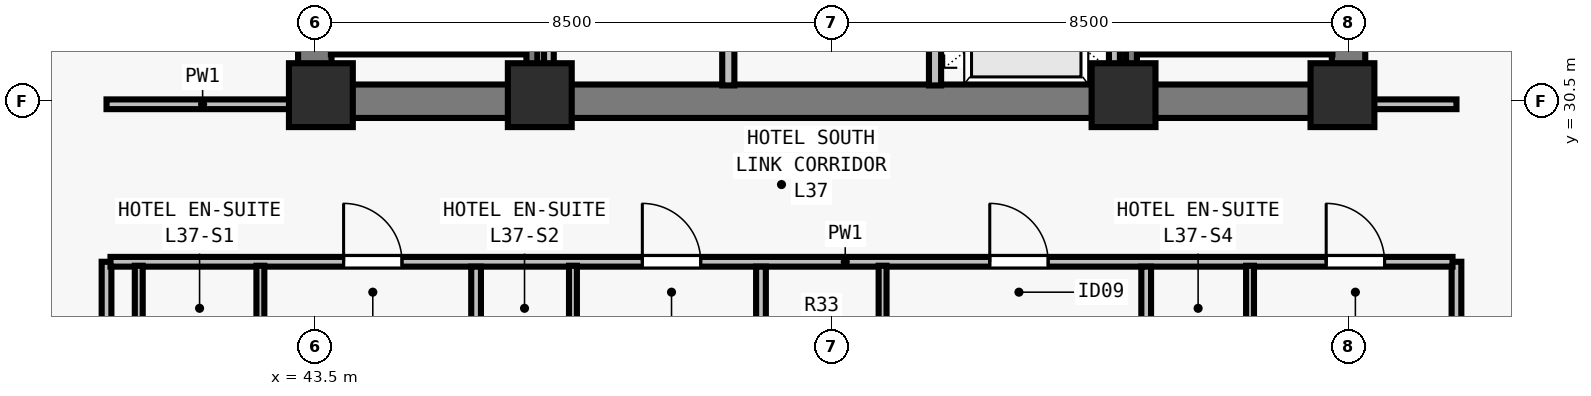
"""IFC4 building model, lengths in metres.
Left out: names, types, materials, properties, quantities, classifications, styles, units other than length and angle.
Written with IfcOpenShell. Run it as: python <this file> out.ifc"""

import sys

from ifc_helpers import new_model, si_unit, direction, frame, frame_2d, origin, origin_2d, place, context, subcontext, project, spatial, rectangle, extrude, element, fill, save


model = new_model("IFC4")
c1 = context("Model", 3, precision=1e-05, world=origin(), true_north=direction((0.0, 1.0)))
c2 = subcontext(c1, "Body", "Model", "MODEL_VIEW")
j1 = project(units=[si_unit("LENGTHUNIT", "METRE"), si_unit("PLANEANGLEUNIT", "RADIAN")], contexts=[c1])
p1 = place(None, origin())
s1 = spatial("IfcSite", under=j1, at=p1, CompositionType="ELEMENT")
p2 = place(p1, origin())
s2 = spatial("IfcBuilding", under=s1, at=p2, CompositionType="ELEMENT")
p3 = place(p2, frame((0.0, 0.0, 137.5)))
s3 = spatial("IfcBuildingStorey", under=s2, at=p3, CompositionType="ELEMENT", Elevation=137.5)
for number, where, z_axis, x_axis in (
    (1, (43.6, 30.6, 0.0), (0.0, 0.0, 1.0), (1.0, 0.0, 0.0)),
    (2, (47.2, 30.6, 0.0), (0.0, 0.0, 1.0), (1.0, 0.0, 0.0)),
    (3, (56.8, 30.6, 0.0), (0.0, 0.0, 1.0), (1.0, 0.0, 0.0)),
    (4, (60.4, 30.6, 0.0), (0.0, 0.0, 1.0), (1.0, 0.0, 0.0)),
):
    element("IfcColumn", number, at=place(p3, frame(where, z_axis=z_axis, x_axis=x_axis)), inside=s3, PredefinedType="COLUMN", context=c2, shape_type="SweptSolid", body=[
        extrude(rectangle(XDim=1.05, YDim=1.05, at=origin_2d()), origin(), (0.0, 0.0, 1.0), 3.5),
    ])
p4 = place(p3, frame((43.225, 30.5, 0.0), z_axis=(0.0, 0.0, 1.0), x_axis=(1.0, 0.0, 0.0)))
e5 = element("IfcWall", 5, at=p4, inside=s3, PredefinedType="SHEAR", context=c2, shape_type="SweptSolid", body=[
    extrude(rectangle(XDim=17.55, YDim=0.55, at=frame_2d((8.775, 0.0))), origin(), (0.0, 0.0, 1.0), 3.28),
])
for number, where, z_axis, x_axis in (
    (6, (43.5, 30.765, 0.0), (0.0, 0.0, 1.0), (0.0, 1.0, 0.0)),
    (7, (60.5, 30.765, 0.0), (0.0, 0.0, 1.0), (0.0, 1.0, 0.0)),
):
    element("IfcWall", number, at=place(p3, frame(where, z_axis=z_axis, x_axis=x_axis)), inside=s3, PredefinedType="SHEAR", context=c2, shape_type="SweptSolid", body=[
        extrude(rectangle(XDim=7.985, YDim=0.55, at=frame_2d((3.993, 0.0))), origin(), (0.0, 0.0, 1.0), 3.28),
    ])
p5 = place(p3, frame((50.3, 30.76, 0.0), z_axis=(0.0, 0.0, 1.0), x_axis=(0.0, 1.0, 0.0)))
e8 = element("IfcWall", 8, at=p5, inside=s3, PredefinedType="SOLIDWALL", context=c2, shape_type="SweptSolid", body=[
    extrude(rectangle(XDim=7.855, YDim=0.2, at=frame_2d((3.927, 0.0))), origin(), (0.0, 0.0, 1.0), 3.28),
])
p6 = place(p5, frame((3.29, 0.0, 0.0)))
e9 = element("IfcOpeningElement", 9, at=p6, cuts=e8, PredefinedType="OPENING", context=c2, shape_type="SweptSolid", body=[
    extrude(rectangle(XDim=0.9, YDim=2.12, at=frame_2d((0.45, 1.06))), frame((0.0, 0.11, 0.0), z_axis=(0.0, -1.0, 0.0), x_axis=(1.0, 0.0, 0.0)), (0.0, 0.0, 1.0), 0.22),
])
p7 = place(p3, frame((53.7, 30.76, 0.0), z_axis=(0.0, 0.0, 1.0), x_axis=(0.0, 1.0, 0.0)))
e10 = element("IfcWall", 10, at=p7, inside=s3, PredefinedType="SOLIDWALL", context=c2, shape_type="SweptSolid", body=[
    extrude(rectangle(XDim=7.855, YDim=0.2, at=frame_2d((3.927, 0.0))), origin(), (0.0, 0.0, 1.0), 3.28),
])
p8 = place(p7, frame((0.79, 0.0, 0.0)))
e11 = element("IfcOpeningElement", 11, at=p8, cuts=e10, PredefinedType="OPENING", context=c2, shape_type="SweptSolid", body=[
    extrude(rectangle(XDim=1.1, YDim=2.2, at=frame_2d((0.55, 1.1))), frame((0.0, 0.11, 0.0), z_axis=(0.0, -1.0, 0.0), x_axis=(1.0, 0.0, 0.0)), (0.0, 0.0, 1.0), 0.22),
])
p9 = place(p7, frame((3.49, 0.0, 0.0)))
e12 = element("IfcOpeningElement", 12, at=p9, cuts=e10, PredefinedType="OPENING", context=c2, shape_type="SweptSolid", body=[
    extrude(rectangle(XDim=1.1, YDim=2.2, at=frame_2d((0.55, 1.1))), frame((0.0, 0.11, 0.0), z_axis=(0.0, -1.0, 0.0), x_axis=(1.0, 0.0, 0.0)), (0.0, 0.0, 1.0), 0.22),
])
p10 = place(p7, frame((6.19, 0.0, 0.0)))
e13 = element("IfcOpeningElement", 13, at=p10, cuts=e10, PredefinedType="OPENING", context=c2, shape_type="SweptSolid", body=[
    extrude(rectangle(XDim=1.1, YDim=2.2, at=frame_2d((0.55, 1.1))), frame((0.0, 0.11, 0.0), z_axis=(0.0, -1.0, 0.0), x_axis=(1.0, 0.0, 0.0)), (0.0, 0.0, 1.0), 0.22),
])
p11 = place(p3, frame((47.35, 30.76, 0.0), z_axis=(0.0, 0.0, 1.0), x_axis=(0.0, 1.0, 0.0)))
e14 = element("IfcWall", 14, at=p11, inside=s3, PredefinedType="PARTITIONING", context=c2, shape_type="SweptSolid", body=[
    extrude(rectangle(XDim=7.855, YDim=0.16, at=frame_2d((3.927, 0.0))), origin(), (0.0, 0.0, 1.0), 3.28),
])
p12 = place(p3, frame((56.65, 30.76, 0.0), z_axis=(0.0, 0.0, 1.0), x_axis=(0.0, 1.0, 0.0)))
e15 = element("IfcWall", 15, at=p12, inside=s3, PredefinedType="SOLIDWALL", context=c2, shape_type="SweptSolid", body=[
    extrude(rectangle(XDim=7.855, YDim=0.18, at=frame_2d((3.927, 0.0))), origin(), (0.0, 0.0, 1.0), 3.28),
])
p13 = place(p3, frame((40.075, 15.325, 0.0), z_axis=(0.0, 0.0, 1.0), x_axis=(0.0, 1.0, 0.0)))
e16 = element("IfcWall", 16, at=p13, inside=s3, PredefinedType="PARTITIONING", context=c2, shape_type="SweptSolid", body=[
    extrude(rectangle(XDim=12.535, YDim=0.16, at=frame_2d((6.268, 0.0))), origin(), (0.0, 0.0, 1.0), 2.555),
])
p14 = place(p3, frame((40.075, 30.45, 0.0), z_axis=(0.0, 0.0, 1.0), x_axis=(1.0, 0.0, 0.0)))
e17 = element("IfcWall", 17, at=p14, inside=s3, PredefinedType="PARTITIONING", context=c2, shape_type="SweptSolid", body=[
    extrude(rectangle(XDim=3.16, YDim=0.16, at=frame_2d((1.58, 0.0))), origin(), (0.0, 0.0, 1.0), 3.28),
])
p15 = place(p3, frame((62.275, 15.325, 0.0), z_axis=(0.0, 0.0, 1.0), x_axis=(0.0, 1.0, 0.0)))
e18 = element("IfcWall", 18, at=p15, inside=s3, PredefinedType="PARTITIONING", context=c2, shape_type="SweptSolid", body=[
    extrude(rectangle(XDim=12.535, YDim=0.16, at=frame_2d((6.268, 0.0))), origin(), (0.0, 0.0, 1.0), 3.28),
])
p16 = place(p3, frame((60.765, 30.45, 0.0), z_axis=(0.0, 0.0, 1.0), x_axis=(1.0, 0.0, 0.0)))
e19 = element("IfcWall", 19, at=p16, inside=s3, PredefinedType="PARTITIONING", context=c2, shape_type="SweptSolid", body=[
    extrude(rectangle(XDim=1.51, YDim=0.16, at=frame_2d((0.755, 0.0))), origin(), (0.0, 0.0, 1.0), 3.28),
])
p17 = place(p3, frame((40.14, 27.86, 0.0), z_axis=(0.0, 0.0, 1.0), x_axis=(1.0, 0.0, 0.0)))
e20 = element("IfcWall", 20, at=p17, inside=s3, PredefinedType="PARTITIONING", context=c2, shape_type="SweptSolid", body=[
    extrude(rectangle(XDim=22.07, YDim=0.16, at=frame_2d((11.035, 0.0))), origin(), (0.0, 0.0, 1.0), 3.28),
])
p18 = place(p17, frame((3.834, 0.0, 0.0)))
e21 = element("IfcOpeningElement", 21, at=p18, cuts=e20, PredefinedType="OPENING", context=c2, shape_type="SweptSolid", body=[
    extrude(rectangle(XDim=0.96, YDim=2.15, at=frame_2d((0.48, 1.075))), frame((0.0, 0.09, 0.0), z_axis=(0.0, -1.0, 0.0), x_axis=(1.0, 0.0, 0.0)), (0.0, 0.0, 1.0), 0.18),
])
p19 = place(p17, frame((8.746, 0.0, 0.0)))
e22 = element("IfcOpeningElement", 22, at=p19, cuts=e20, PredefinedType="OPENING", context=c2, shape_type="SweptSolid", body=[
    extrude(rectangle(XDim=0.96, YDim=2.15, at=frame_2d((0.48, 1.075))), frame((0.0, 0.09, 0.0), z_axis=(0.0, -1.0, 0.0), x_axis=(1.0, 0.0, 0.0)), (0.0, 0.0, 1.0), 0.18),
])
p20 = place(p17, frame((14.46, 0.0, 0.0)))
e23 = element("IfcOpeningElement", 23, at=p20, cuts=e20, PredefinedType="OPENING", context=c2, shape_type="SweptSolid", body=[
    extrude(rectangle(XDim=0.96, YDim=2.15, at=frame_2d((0.48, 1.075))), frame((0.0, 0.09, 0.0), z_axis=(0.0, -1.0, 0.0), x_axis=(1.0, 0.0, 0.0)), (0.0, 0.0, 1.0), 0.18),
])
p21 = place(p17, frame((19.993, 0.0, 0.0)))
e24 = element("IfcOpeningElement", 24, at=p21, cuts=e20, PredefinedType="OPENING", context=c2, shape_type="SweptSolid", body=[
    extrude(rectangle(XDim=0.96, YDim=2.15, at=frame_2d((0.48, 1.075))), frame((0.0, 0.09, 0.0), z_axis=(0.0, -1.0, 0.0), x_axis=(1.0, 0.0, 0.0)), (0.0, 0.0, 1.0), 0.18),
])
p22 = place(p3, frame((40.605, 25.48, 0.0), z_axis=(0.0, 0.0, 1.0), x_axis=(0.0, 1.0, 0.0)))
e25 = element("IfcWall", 25, at=p22, inside=s3, PredefinedType="PLUMBINGWALL", context=c2, shape_type="SweptSolid", body=[
    extrude(rectangle(XDim=2.315, YDim=0.13, at=frame_2d((1.157, 0.0))), origin(), (0.0, 0.0, 1.0), 2.555),
])
p23 = place(p3, frame((42.605, 25.48, 0.0), z_axis=(0.0, 0.0, 1.0), x_axis=(0.0, 1.0, 0.0)))
e26 = element("IfcWall", 26, at=p23, inside=s3, PredefinedType="PLUMBINGWALL", context=c2, shape_type="SweptSolid", body=[
    extrude(rectangle(XDim=2.315, YDim=0.13, at=frame_2d((1.157, 0.0))), origin(), (0.0, 0.0, 1.0), 3.28),
])
p24 = place(p3, frame((46.153, 15.325, 0.0), z_axis=(0.0, 0.0, 1.0), x_axis=(0.0, 1.0, 0.0)))
e27 = element("IfcWall", 27, at=p24, inside=s3, PredefinedType="PARTITIONING", context=c2, shape_type="SweptSolid", body=[
    extrude(rectangle(XDim=12.455, YDim=0.16, at=frame_2d((6.228, 0.0))), origin(), (0.0, 0.0, 1.0), 3.28),
])
p25 = place(p3, frame((47.745, 25.48, 0.0), z_axis=(0.0, 0.0, 1.0), x_axis=(0.0, 1.0, 0.0)))
e28 = element("IfcWall", 28, at=p25, inside=s3, PredefinedType="PLUMBINGWALL", context=c2, shape_type="SweptSolid", body=[
    extrude(rectangle(XDim=2.315, YDim=0.13, at=frame_2d((1.157, 0.0))), origin(), (0.0, 0.0, 1.0), 3.28),
])
p26 = place(p3, frame((50.837, 15.325, 0.0), z_axis=(0.0, 0.0, 1.0), x_axis=(0.0, 1.0, 0.0)))
e29 = element("IfcWall", 29, at=p26, inside=s3, PredefinedType="PARTITIONING", context=c2, shape_type="SweptSolid", body=[
    extrude(rectangle(XDim=12.455, YDim=0.16, at=frame_2d((6.228, 0.0))), origin(), (0.0, 0.0, 1.0), 2.896),
])
p27 = place(p3, frame((52.837, 25.48, 0.0), z_axis=(0.0, 0.0, 1.0), x_axis=(0.0, 1.0, 0.0)))
e30 = element("IfcWall", 30, at=p27, inside=s3, PredefinedType="PLUMBINGWALL", context=c2, shape_type="SweptSolid", body=[
    extrude(rectangle(XDim=2.315, YDim=0.13, at=frame_2d((1.157, 0.0))), origin(), (0.0, 0.0, 1.0), 3.28),
])
p28 = place(p3, frame((57.173, 15.325, 0.0), z_axis=(0.0, 0.0, 1.0), x_axis=(0.0, 1.0, 0.0)))
e31 = element("IfcWall", 31, at=p28, inside=s3, PredefinedType="PARTITIONING", context=c2, shape_type="SweptSolid", body=[
    extrude(rectangle(XDim=12.455, YDim=0.16, at=frame_2d((6.228, 0.0))), origin(), (0.0, 0.0, 1.0), 3.28),
])
p29 = place(p3, frame((58.88, 25.48, 0.0), z_axis=(0.0, 0.0, 1.0), x_axis=(0.0, 1.0, 0.0)))
e32 = element("IfcWall", 32, at=p29, inside=s3, PredefinedType="PLUMBINGWALL", context=c2, shape_type="SweptSolid", body=[
    extrude(rectangle(XDim=2.315, YDim=0.13, at=frame_2d((1.157, 0.0))), origin(), (0.0, 0.0, 1.0), 3.28),
])
p30 = place(p3, frame((43.765, 31.36, 0.0), z_axis=(0.0, 0.0, 1.0), x_axis=(1.0, 0.0, 0.0)))
e33 = element("IfcWall", 33, at=p30, inside=s3, PredefinedType="SOLIDWALL", context=c2, shape_type="SweptSolid", body=[
    extrude(rectangle(XDim=3.23, YDim=0.18, at=frame_2d((1.615, 0.0))), origin(), (0.0, 0.0, 1.0), 3.28),
])
p31 = place(p3, frame((47.07, 38.78, 0.0), z_axis=(0.0, 0.0, 1.0), x_axis=(0.0, -1.0, 0.0)))
e34 = element("IfcWall", 34, at=p31, inside=s3, PredefinedType="SOLIDWALL", context=c2, shape_type="SweptSolid", body=[
    extrude(rectangle(XDim=8.017, YDim=0.18, at=frame_2d((4.009, 0.0))), origin(), (0.0, 0.0, 1.0), 3.28),
])
p32 = place(p3, frame((57.005, 31.36, 0.0), z_axis=(0.0, 0.0, 1.0), x_axis=(1.0, 0.0, 0.0)))
e35 = element("IfcWall", 35, at=p32, inside=s3, PredefinedType="SOLIDWALL", context=c2, shape_type="SweptSolid", body=[
    extrude(rectangle(XDim=3.23, YDim=0.18, at=frame_2d((1.615, 0.0))), origin(), (0.0, 0.0, 1.0), 3.28),
])
p33 = place(p3, frame((56.93, 38.78, 0.0), z_axis=(0.0, 0.0, 1.0), x_axis=(0.0, -1.0, 0.0)))
e36 = element("IfcWall", 36, at=p33, inside=s3, PredefinedType="SOLIDWALL", context=c2, shape_type="SweptSolid", body=[
    extrude(rectangle(XDim=8.017, YDim=0.18, at=frame_2d((4.009, 0.0))), origin(), (0.0, 0.0, 1.0), 3.28),
])
p34 = place(p18, origin())
e37 = element("IfcDoor", 37, at=p34, inside=s3, OperationType="SINGLE_SWING_LEFT", PredefinedType="DOOR", context=c2, shape_type="SweptSolid", body=[
    extrude(rectangle(XDim=0.96, YDim=2.15, at=frame_2d((0.48, 1.075))), frame((0.0, 0.025, 0.0), z_axis=(0.0, -1.0, 0.0), x_axis=(1.0, 0.0, 0.0)), (0.0, 0.0, 1.0), 0.05),
])
fill(e21, e37)
p35 = place(p19, origin())
e38 = element("IfcDoor", 38, at=p35, inside=s3, OperationType="SINGLE_SWING_LEFT", PredefinedType="DOOR", context=c2, shape_type="SweptSolid", body=[
    extrude(rectangle(XDim=0.96, YDim=2.15, at=frame_2d((0.48, 1.075))), frame((0.0, 0.025, 0.0), z_axis=(0.0, -1.0, 0.0), x_axis=(1.0, 0.0, 0.0)), (0.0, 0.0, 1.0), 0.05),
])
fill(e22, e38)
p36 = place(p20, origin())
e39 = element("IfcDoor", 39, at=p36, inside=s3, OperationType="SINGLE_SWING_LEFT", PredefinedType="DOOR", context=c2, shape_type="SweptSolid", body=[
    extrude(rectangle(XDim=0.96, YDim=2.15, at=frame_2d((0.48, 1.075))), frame((0.0, 0.025, 0.0), z_axis=(0.0, -1.0, 0.0), x_axis=(1.0, 0.0, 0.0)), (0.0, 0.0, 1.0), 0.05),
])
fill(e23, e39)
p37 = place(p21, origin())
e40 = element("IfcDoor", 40, at=p37, inside=s3, OperationType="SINGLE_SWING_LEFT", PredefinedType="DOOR", context=c2, shape_type="SweptSolid", body=[
    extrude(rectangle(XDim=0.96, YDim=2.15, at=frame_2d((0.48, 1.075))), frame((0.0, 0.025, 0.0), z_axis=(0.0, -1.0, 0.0), x_axis=(1.0, 0.0, 0.0)), (0.0, 0.0, 1.0), 0.05),
])
fill(e24, e40)
save(model, sys.argv[1])
